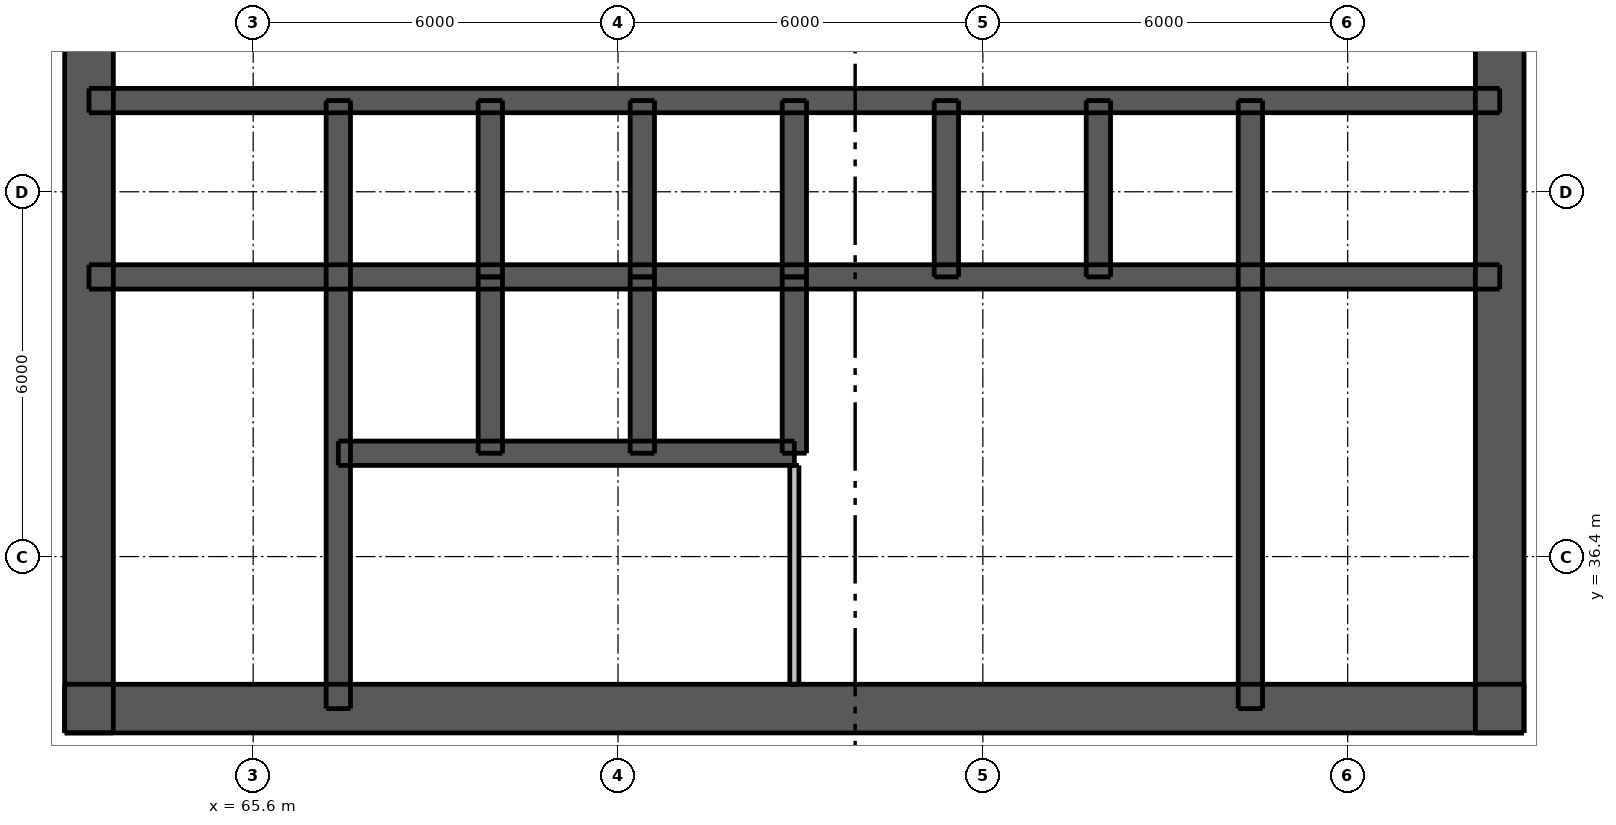
"""IFC4 building model, lengths in metres.
Left out: names, types, materials, properties, quantities, classifications, styles, units other than length and angle.
Written with IfcOpenShell. Run it as: python <this file> out.ifc"""

import sys

from ifc_helpers import new_model, si_unit, direction, frame, frame_2d, origin, place, context, subcontext, project, spatial, rectangle, extrude, element, fill, save


model = new_model("IFC4")
c1 = context("Model", 3, precision=1e-05, world=origin(), true_north=direction((0.0, 1.0)))
c2 = subcontext(c1, "Body", "Model", "MODEL_VIEW")
j1 = project(units=[si_unit("LENGTHUNIT", "METRE"), si_unit("PLANEANGLEUNIT", "RADIAN")], contexts=[c1])
p1 = place(None, origin())
s1 = spatial("IfcSite", under=j1, at=p1, CompositionType="ELEMENT")
p2 = place(p1, origin())
s2 = spatial("IfcBuilding", under=s1, at=p2, CompositionType="ELEMENT")
p3 = place(p2, frame((0.0, 0.0, 105.1)))
s3 = spatial("IfcBuildingStorey", under=s2, at=p3, CompositionType="ELEMENT", Elevation=105.1)
p4 = place(p3, frame((62.5, 33.9, 0.0), z_axis=(0.0, 0.0, 1.0), x_axis=(1.0, 0.0, 0.0)))
e1 = element("IfcWall", 1, at=p4, inside=s3, PredefinedType="SHEAR", context=c2, shape_type="SweptSolid", body=[
    extrude(rectangle(XDim=24.0, YDim=0.8, at=frame_2d((12.0, 0.0))), origin(), (0.0, 0.0, 1.0), 3.05),
])
p5 = place(p4, frame((2.0, 0.0, 0.0)))
e2 = element("IfcOpeningElement", 2, at=p5, cuts=e1, PredefinedType="OPENING", context=c2, shape_type="SweptSolid", body=[
    extrude(rectangle(XDim=1.1, YDim=2.1, at=frame_2d((0.55, 1.05))), frame((0.0, 0.41, 0.0), z_axis=(0.0, -1.0, 0.0), x_axis=(1.0, 0.0, 0.0)), (0.0, 0.0, 1.0), 0.82),
])
p6 = place(p4, frame((20.9, 0.0, 0.0)))
e3 = element("IfcOpeningElement", 3, at=p6, cuts=e1, PredefinedType="OPENING", context=c2, shape_type="SweptSolid", body=[
    extrude(rectangle(XDim=1.1, YDim=2.1, at=frame_2d((0.55, 1.05))), frame((0.0, 0.41, 0.0), z_axis=(0.0, -1.0, 0.0), x_axis=(1.0, 0.0, 0.0)), (0.0, 0.0, 1.0), 0.82),
])
p7 = place(p4, frame((8.0, 0.0, 0.0)))
e4 = element("IfcOpeningElement", 4, at=p7, cuts=e1, PredefinedType="OPENING", context=c2, shape_type="SweptSolid", body=[
    extrude(rectangle(XDim=1.1, YDim=2.1, at=frame_2d((0.55, 1.05))), frame((0.0, 0.41, 0.0), z_axis=(0.0, -1.0, 0.0), x_axis=(1.0, 0.0, 0.0)), (0.0, 0.0, 1.0), 0.82),
])
p8 = place(p4, frame((15.3, 0.0, 0.0)))
e5 = element("IfcOpeningElement", 5, at=p8, cuts=e1, PredefinedType="OPENING", context=c2, shape_type="SweptSolid", body=[
    extrude(rectangle(XDim=0.9, YDim=2.1, at=frame_2d((0.45, 1.05))), frame((0.0, 0.41, 0.0), z_axis=(0.0, -1.0, 0.0), x_axis=(1.0, 0.0, 0.0)), (0.0, 0.0, 1.0), 0.82),
])
p9 = place(p3, frame((62.9, 33.5, 0.0), z_axis=(0.0, 0.0, 1.0), x_axis=(0.0, 1.0, 0.0)))
e6 = element("IfcWall", 6, at=p9, inside=s3, PredefinedType="SHEAR", context=c2, shape_type="SweptSolid", body=[
    extrude(rectangle(XDim=24.0, YDim=0.8, at=frame_2d((12.0, 0.0))), origin(), (0.0, 0.0, 1.0), 3.05),
])
p10 = place(p9, frame((11.2, 0.0, 0.0)))
e7 = element("IfcOpeningElement", 7, at=p10, cuts=e6, PredefinedType="OPENING", context=c2, shape_type="SweptSolid", body=[
    extrude(rectangle(XDim=1.6, YDim=2.1, at=frame_2d((0.8, 1.05))), frame((0.0, 0.41, 0.0), z_axis=(0.0, -1.0, 0.0), x_axis=(1.0, 0.0, 0.0)), (0.0, 0.0, 1.0), 0.82),
])
p11 = place(p3, frame((86.1, 33.5, 0.0), z_axis=(0.0, 0.0, 1.0), x_axis=(0.0, 1.0, 0.0)))
e8 = element("IfcWall", 8, at=p11, inside=s3, PredefinedType="SHEAR", context=c2, shape_type="SweptSolid", body=[
    extrude(rectangle(XDim=24.0, YDim=0.8, at=frame_2d((12.0, 0.0))), origin(), (0.0, 0.0, 1.0), 3.05),
])
p12 = place(p11, frame((11.2, 0.0, 0.0)))
e9 = element("IfcOpeningElement", 9, at=p12, cuts=e8, PredefinedType="OPENING", context=c2, shape_type="SweptSolid", body=[
    extrude(rectangle(XDim=1.6, YDim=2.1, at=frame_2d((0.8, 1.05))), frame((0.0, 0.41, 0.0), z_axis=(0.0, -1.0, 0.0), x_axis=(1.0, 0.0, 0.0)), (0.0, 0.0, 1.0), 0.82),
])
p13 = place(p3, frame((62.9, 41.0, 0.0), z_axis=(0.0, 0.0, 1.0), x_axis=(1.0, 0.0, 0.0)))
e10 = element("IfcWall", 10, at=p13, inside=s3, PredefinedType="SHEAR", context=c2, shape_type="SweptSolid", body=[
    extrude(rectangle(XDim=23.2, YDim=0.4, at=frame_2d((11.6, 0.0))), origin(), (0.0, 0.0, 1.0), 3.05),
])
p14 = place(p3, frame((62.9, 43.9, 0.0), z_axis=(0.0, 0.0, 1.0), x_axis=(1.0, 0.0, 0.0)))
e11 = element("IfcWall", 11, at=p14, inside=s3, PredefinedType="SHEAR", context=c2, shape_type="SweptSolid", body=[
    extrude(rectangle(XDim=23.2, YDim=0.4, at=frame_2d((11.6, 0.0))), origin(), (0.0, 0.0, 1.0), 3.05),
])
p15 = place(p14, frame((1.7, 0.0, 0.0)))
e12 = element("IfcOpeningElement", 12, at=p15, cuts=e11, PredefinedType="OPENING", context=c2, shape_type="SweptSolid", body=[
    extrude(rectangle(XDim=0.9, YDim=2.1, at=frame_2d((0.45, 1.05))), frame((0.0, 0.21, 0.0), z_axis=(0.0, -1.0, 0.0), x_axis=(1.0, 0.0, 0.0)), (0.0, 0.0, 1.0), 0.42),
])
p16 = place(p14, frame((20.6, 0.0, 0.0)))
e13 = element("IfcOpeningElement", 13, at=p16, cuts=e11, PredefinedType="OPENING", context=c2, shape_type="SweptSolid", body=[
    extrude(rectangle(XDim=0.9, YDim=2.1, at=frame_2d((0.45, 1.05))), frame((0.0, 0.21, 0.0), z_axis=(0.0, -1.0, 0.0), x_axis=(1.0, 0.0, 0.0)), (0.0, 0.0, 1.0), 0.42),
])
p17 = place(p14, frame((4.8, 0.0, 0.0)))
e14 = element("IfcOpeningElement", 14, at=p17, cuts=e11, PredefinedType="OPENING", context=c2, shape_type="SweptSolid", body=[
    extrude(rectangle(XDim=1.1, YDim=2.1, at=frame_2d((0.55, 1.05))), frame((0.0, 0.21, 0.0), z_axis=(0.0, -1.0, 0.0), x_axis=(1.0, 0.0, 0.0)), (0.0, 0.0, 1.0), 0.42),
])
p18 = place(p14, frame((7.3, 0.0, 0.0)))
e15 = element("IfcOpeningElement", 15, at=p18, cuts=e11, PredefinedType="OPENING", context=c2, shape_type="SweptSolid", body=[
    extrude(rectangle(XDim=1.1, YDim=2.1, at=frame_2d((0.55, 1.05))), frame((0.0, 0.21, 0.0), z_axis=(0.0, -1.0, 0.0), x_axis=(1.0, 0.0, 0.0)), (0.0, 0.0, 1.0), 0.42),
])
p19 = place(p14, frame((9.8, 0.0, 0.0)))
e16 = element("IfcOpeningElement", 16, at=p19, cuts=e11, PredefinedType="OPENING", context=c2, shape_type="SweptSolid", body=[
    extrude(rectangle(XDim=1.1, YDim=2.1, at=frame_2d((0.55, 1.05))), frame((0.0, 0.21, 0.0), z_axis=(0.0, -1.0, 0.0), x_axis=(1.0, 0.0, 0.0)), (0.0, 0.0, 1.0), 0.42),
])
p20 = place(p14, frame((12.3, 0.0, 0.0)))
e17 = element("IfcOpeningElement", 17, at=p20, cuts=e11, PredefinedType="OPENING", context=c2, shape_type="SweptSolid", body=[
    extrude(rectangle(XDim=1.1, YDim=2.1, at=frame_2d((0.55, 1.05))), frame((0.0, 0.21, 0.0), z_axis=(0.0, -1.0, 0.0), x_axis=(1.0, 0.0, 0.0)), (0.0, 0.0, 1.0), 0.42),
])
p21 = place(p14, frame((14.8, 0.0, 0.0)))
e18 = element("IfcOpeningElement", 18, at=p21, cuts=e11, PredefinedType="OPENING", context=c2, shape_type="SweptSolid", body=[
    extrude(rectangle(XDim=1.1, YDim=2.1, at=frame_2d((0.55, 1.05))), frame((0.0, 0.21, 0.0), z_axis=(0.0, -1.0, 0.0), x_axis=(1.0, 0.0, 0.0)), (0.0, 0.0, 1.0), 0.42),
])
p22 = place(p14, frame((17.3, 0.0, 0.0)))
e19 = element("IfcOpeningElement", 19, at=p22, cuts=e11, PredefinedType="OPENING", context=c2, shape_type="SweptSolid", body=[
    extrude(rectangle(XDim=1.1, YDim=2.1, at=frame_2d((0.55, 1.05))), frame((0.0, 0.21, 0.0), z_axis=(0.0, -1.0, 0.0), x_axis=(1.0, 0.0, 0.0)), (0.0, 0.0, 1.0), 0.42),
])
p23 = place(p3, frame((67.0, 33.9, 0.0), z_axis=(0.0, 0.0, 1.0), x_axis=(0.0, 1.0, 0.0)))
e20 = element("IfcWall", 20, at=p23, inside=s3, PredefinedType="SHEAR", context=c2, shape_type="SweptSolid", body=[
    extrude(rectangle(XDim=10.0, YDim=0.4, at=frame_2d((5.0, 0.0))), origin(), (0.0, 0.0, 1.0), 3.05),
])
p24 = place(p23, frame((0.6, 0.0, 0.0)))
e21 = element("IfcOpeningElement", 21, at=p24, cuts=e20, PredefinedType="OPENING", context=c2, shape_type="SweptSolid", body=[
    extrude(rectangle(XDim=1.1, YDim=2.1, at=frame_2d((0.55, 1.05))), frame((0.0, 0.21, 0.0), z_axis=(0.0, -1.0, 0.0), x_axis=(1.0, 0.0, 0.0)), (0.0, 0.0, 1.0), 0.42),
])
p25 = place(p3, frame((82.0, 33.9, 0.0), z_axis=(0.0, 0.0, 1.0), x_axis=(0.0, 1.0, 0.0)))
e22 = element("IfcWall", 22, at=p25, inside=s3, PredefinedType="SHEAR", context=c2, shape_type="SweptSolid", body=[
    extrude(rectangle(XDim=10.0, YDim=0.4, at=frame_2d((5.0, 0.0))), origin(), (0.0, 0.0, 1.0), 3.05),
])
for number, where, z_axis, x_axis in (
    (23, (69.5, 41.0, 0.0), (0.0, 0.0, 1.0), (0.0, 1.0, 0.0)),
    (24, (72.0, 41.0, 0.0), (0.0, 0.0, 1.0), (0.0, 1.0, 0.0)),
    (25, (74.5, 41.0, 0.0), (0.0, 0.0, 1.0), (0.0, 1.0, 0.0)),
    (26, (77.0, 41.0, 0.0), (0.0, 0.0, 1.0), (0.0, 1.0, 0.0)),
    (27, (79.5, 41.0, 0.0), (0.0, 0.0, 1.0), (0.0, 1.0, 0.0)),
):
    element("IfcWall", number, at=place(p3, frame(where, z_axis=z_axis, x_axis=x_axis)), inside=s3, PredefinedType="SHEAR", context=c2, shape_type="SweptSolid", body=[
        extrude(rectangle(XDim=2.9, YDim=0.4, at=frame_2d((1.45, 0.0))), origin(), (0.0, 0.0, 1.0), 3.05),
    ])
p26 = place(p3, frame((67.0, 38.1, 0.0), z_axis=(0.0, 0.0, 1.0), x_axis=(1.0, 0.0, 0.0)))
e28 = element("IfcWall", 28, at=p26, inside=s3, PredefinedType="SHEAR", context=c2, shape_type="SweptSolid", body=[
    extrude(rectangle(XDim=7.5, YDim=0.4, at=frame_2d((3.75, 0.0))), origin(), (0.0, 0.0, 1.0), 3.05),
])
p27 = place(p26, frame((0.7, 0.0, 0.0)))
e29 = element("IfcOpeningElement", 29, at=p27, cuts=e28, PredefinedType="OPENING", context=c2, shape_type="SweptSolid", body=[
    extrude(rectangle(XDim=1.1, YDim=2.1, at=frame_2d((0.55, 1.05))), frame((0.0, 0.21, 0.0), z_axis=(0.0, -1.0, 0.0), x_axis=(1.0, 0.0, 0.0)), (0.0, 0.0, 1.0), 0.42),
])
p28 = place(p26, frame((3.2, 0.0, 0.0)))
e30 = element("IfcOpeningElement", 30, at=p28, cuts=e28, PredefinedType="OPENING", context=c2, shape_type="SweptSolid", body=[
    extrude(rectangle(XDim=1.1, YDim=2.1, at=frame_2d((0.55, 1.05))), frame((0.0, 0.21, 0.0), z_axis=(0.0, -1.0, 0.0), x_axis=(1.0, 0.0, 0.0)), (0.0, 0.0, 1.0), 0.42),
])
p29 = place(p26, frame((5.65, 0.0, 0.0)))
e31 = element("IfcOpeningElement", 31, at=p29, cuts=e28, PredefinedType="OPENING", context=c2, shape_type="SweptSolid", body=[
    extrude(rectangle(XDim=1.2, YDim=2.1, at=frame_2d((0.6, 1.05))), frame((0.0, 0.21, 0.0), z_axis=(0.0, -1.0, 0.0), x_axis=(1.0, 0.0, 0.0)), (0.0, 0.0, 1.0), 0.42),
])
for number, where, z_axis, x_axis in (
    (32, (69.5, 38.1, 0.0), (0.0, 0.0, 1.0), (0.0, 1.0, 0.0)),
    (33, (72.0, 38.1, 0.0), (0.0, 0.0, 1.0), (0.0, 1.0, 0.0)),
    (34, (74.5, 38.1, 0.0), (0.0, 0.0, 1.0), (0.0, 1.0, 0.0)),
):
    element("IfcWall", number, at=place(p3, frame(where, z_axis=z_axis, x_axis=x_axis)), inside=s3, PredefinedType="SHEAR", context=c2, shape_type="SweptSolid", body=[
        extrude(rectangle(XDim=2.9, YDim=0.4, at=frame_2d((1.45, 0.0))), origin(), (0.0, 0.0, 1.0), 3.05),
    ])
p30 = place(p3, frame((74.5, 34.3, 0.0), z_axis=(0.0, 0.0, 1.0), x_axis=(0.0, 1.0, 0.0)))
e35 = element("IfcWall", 35, at=p30, inside=s3, PredefinedType="PLUMBINGWALL", context=c2, shape_type="SweptSolid", body=[
    extrude(rectangle(XDim=3.6, YDim=0.15, at=frame_2d((1.8, 0.0))), origin(), (0.0, 0.0, 1.0), 3.05),
])
p31 = place(p5, origin())
e36 = element("IfcDoor", 36, at=p31, inside=s3, OperationType="SINGLE_SWING_LEFT", PredefinedType="DOOR", context=c2, shape_type="SweptSolid", body=[
    extrude(rectangle(XDim=1.1, YDim=2.1, at=frame_2d((0.55, 1.05))), frame((0.0, 0.388, 0.0), z_axis=(0.0, -1.0, 0.0), x_axis=(1.0, 0.0, 0.0)), (0.0, 0.0, 1.0), 0.05),
])
fill(e2, e36)
p32 = place(p6, origin())
e37 = element("IfcDoor", 37, at=p32, inside=s3, OperationType="SINGLE_SWING_RIGHT", PredefinedType="DOOR", context=c2, shape_type="SweptSolid", body=[
    extrude(rectangle(XDim=1.1, YDim=2.1, at=frame_2d((0.55, 1.05))), frame((0.0, 0.388, 0.0), z_axis=(0.0, -1.0, 0.0), x_axis=(1.0, 0.0, 0.0)), (0.0, 0.0, 1.0), 0.05),
])
fill(e3, e37)
p33 = place(p7, origin())
e38 = element("IfcDoor", 38, at=p33, inside=s3, OperationType="SINGLE_SWING_LEFT", PredefinedType="DOOR", context=c2, shape_type="SweptSolid", body=[
    extrude(rectangle(XDim=1.1, YDim=2.1, at=frame_2d((0.55, 1.05))), frame((0.0, 0.388, 0.0), z_axis=(0.0, -1.0, 0.0), x_axis=(1.0, 0.0, 0.0)), (0.0, 0.0, 1.0), 0.05),
])
fill(e4, e38)
p34 = place(p24, origin())
e39 = element("IfcDoor", 39, at=p34, inside=s3, OperationType="SINGLE_SWING_RIGHT", PredefinedType="DOOR", context=c2, shape_type="SweptSolid", body=[
    extrude(rectangle(XDim=1.1, YDim=2.1, at=frame_2d((0.55, 1.05))), frame((0.0, -0.138, 0.0), z_axis=(0.0, -1.0, 0.0), x_axis=(1.0, 0.0, 0.0)), (0.0, 0.0, 1.0), 0.05),
])
fill(e21, e39)
p35 = place(p8, origin())
e40 = element("IfcDoor", 40, at=p35, inside=s3, OperationType="SINGLE_SWING_LEFT", PredefinedType="DOOR", context=c2, shape_type="SweptSolid", body=[
    extrude(rectangle(XDim=0.9, YDim=2.1, at=frame_2d((0.45, 1.05))), frame((0.0, 0.388, 0.0), z_axis=(0.0, -1.0, 0.0), x_axis=(1.0, 0.0, 0.0)), (0.0, 0.0, 1.0), 0.05),
])
fill(e5, e40)
p36 = place(p15, origin())
e41 = element("IfcDoor", 41, at=p36, inside=s3, OperationType="SINGLE_SWING_LEFT", PredefinedType="DOOR", context=c2, shape_type="SweptSolid", body=[
    extrude(rectangle(XDim=0.9, YDim=2.1, at=frame_2d((0.45, 1.05))), frame((0.0, -0.138, 0.0), z_axis=(0.0, -1.0, 0.0), x_axis=(1.0, 0.0, 0.0)), (0.0, 0.0, 1.0), 0.05),
])
fill(e12, e41)
p37 = place(p16, origin())
e42 = element("IfcDoor", 42, at=p37, inside=s3, OperationType="SINGLE_SWING_LEFT", PredefinedType="DOOR", context=c2, shape_type="SweptSolid", body=[
    extrude(rectangle(XDim=0.9, YDim=2.1, at=frame_2d((0.45, 1.05))), frame((0.0, -0.138, 0.0), z_axis=(0.0, -1.0, 0.0), x_axis=(1.0, 0.0, 0.0)), (0.0, 0.0, 1.0), 0.05),
])
fill(e13, e42)
p38 = place(p17, origin())
e43 = element("IfcDoor", 43, at=p38, inside=s3, OperationType="DOUBLE_DOOR_SLIDING", PredefinedType="DOOR", context=c2, shape_type="SweptSolid", body=[
    extrude(rectangle(XDim=1.1, YDim=2.1, at=frame_2d((0.55, 1.05))), frame((0.0, 0.025, 0.0), z_axis=(0.0, -1.0, 0.0), x_axis=(1.0, 0.0, 0.0)), (0.0, 0.0, 1.0), 0.05),
])
fill(e14, e43)
p39 = place(p18, origin())
e44 = element("IfcDoor", 44, at=p39, inside=s3, OperationType="DOUBLE_DOOR_SLIDING", PredefinedType="DOOR", context=c2, shape_type="SweptSolid", body=[
    extrude(rectangle(XDim=1.1, YDim=2.1, at=frame_2d((0.55, 1.05))), frame((0.0, 0.025, 0.0), z_axis=(0.0, -1.0, 0.0), x_axis=(1.0, 0.0, 0.0)), (0.0, 0.0, 1.0), 0.05),
])
fill(e15, e44)
p40 = place(p19, origin())
e45 = element("IfcDoor", 45, at=p40, inside=s3, OperationType="DOUBLE_DOOR_SLIDING", PredefinedType="DOOR", context=c2, shape_type="SweptSolid", body=[
    extrude(rectangle(XDim=1.1, YDim=2.1, at=frame_2d((0.55, 1.05))), frame((0.0, 0.025, 0.0), z_axis=(0.0, -1.0, 0.0), x_axis=(1.0, 0.0, 0.0)), (0.0, 0.0, 1.0), 0.05),
])
fill(e16, e45)
p41 = place(p20, origin())
e46 = element("IfcDoor", 46, at=p41, inside=s3, OperationType="DOUBLE_DOOR_SLIDING", PredefinedType="DOOR", context=c2, shape_type="SweptSolid", body=[
    extrude(rectangle(XDim=1.1, YDim=2.1, at=frame_2d((0.55, 1.05))), frame((0.0, 0.025, 0.0), z_axis=(0.0, -1.0, 0.0), x_axis=(1.0, 0.0, 0.0)), (0.0, 0.0, 1.0), 0.05),
])
fill(e17, e46)
p42 = place(p21, origin())
e47 = element("IfcDoor", 47, at=p42, inside=s3, OperationType="DOUBLE_DOOR_SLIDING", PredefinedType="DOOR", context=c2, shape_type="SweptSolid", body=[
    extrude(rectangle(XDim=1.1, YDim=2.1, at=frame_2d((0.55, 1.05))), frame((0.0, 0.025, 0.0), z_axis=(0.0, -1.0, 0.0), x_axis=(1.0, 0.0, 0.0)), (0.0, 0.0, 1.0), 0.05),
])
fill(e18, e47)
p43 = place(p22, origin())
e48 = element("IfcDoor", 48, at=p43, inside=s3, OperationType="DOUBLE_DOOR_SLIDING", PredefinedType="DOOR", context=c2, shape_type="SweptSolid", body=[
    extrude(rectangle(XDim=1.1, YDim=2.1, at=frame_2d((0.55, 1.05))), frame((0.0, 0.025, 0.0), z_axis=(0.0, -1.0, 0.0), x_axis=(1.0, 0.0, 0.0)), (0.0, 0.0, 1.0), 0.05),
])
fill(e19, e48)
p44 = place(p27, origin())
e49 = element("IfcDoor", 49, at=p44, inside=s3, OperationType="DOUBLE_DOOR_SLIDING", PredefinedType="DOOR", context=c2, shape_type="SweptSolid", body=[
    extrude(rectangle(XDim=1.1, YDim=2.1, at=frame_2d((0.55, 1.05))), frame((0.0, 0.025, 0.0), z_axis=(0.0, -1.0, 0.0), x_axis=(1.0, 0.0, 0.0)), (0.0, 0.0, 1.0), 0.05),
])
fill(e29, e49)
p45 = place(p28, origin())
e50 = element("IfcDoor", 50, at=p45, inside=s3, OperationType="DOUBLE_DOOR_SLIDING", PredefinedType="DOOR", context=c2, shape_type="SweptSolid", body=[
    extrude(rectangle(XDim=1.1, YDim=2.1, at=frame_2d((0.55, 1.05))), frame((0.0, 0.025, 0.0), z_axis=(0.0, -1.0, 0.0), x_axis=(1.0, 0.0, 0.0)), (0.0, 0.0, 1.0), 0.05),
])
fill(e30, e50)
p46 = place(p29, origin())
e51 = element("IfcDoor", 51, at=p46, inside=s3, OperationType="DOUBLE_DOOR_SLIDING", PredefinedType="DOOR", context=c2, shape_type="SweptSolid", body=[
    extrude(rectangle(XDim=1.2, YDim=2.1, at=frame_2d((0.6, 1.05))), frame((0.0, 0.025, 0.0), z_axis=(0.0, -1.0, 0.0), x_axis=(1.0, 0.0, 0.0)), (0.0, 0.0, 1.0), 0.05),
])
fill(e31, e51)
save(model, sys.argv[1])
